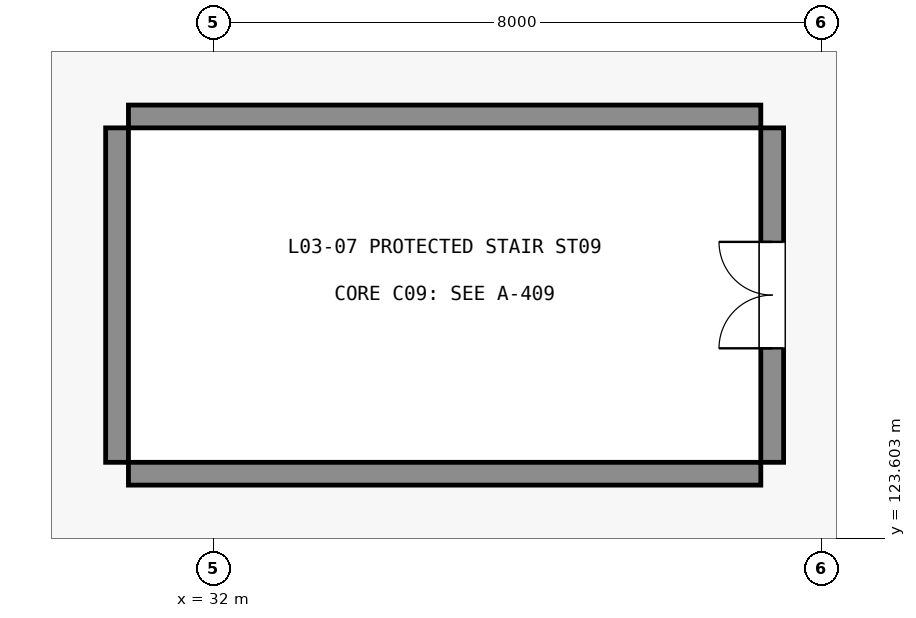
"""IFC4 building model, lengths in metres.
Left out: names, types, materials, properties, quantities, classifications, styles, units other than length and angle.
Written with IfcOpenShell. Run it as: python <this file> out.ifc"""

import sys

from ifc_helpers import new_model, si_unit, direction, frame, frame_2d, origin, place, context, subcontext, project, spatial, rectangle, extrude, element, fill, save


model = new_model("IFC4")
c1 = context("Model", 3, precision=1e-05, world=origin(), true_north=direction((0.0, 1.0)))
c2 = subcontext(c1, "Body", "Model", "MODEL_VIEW")
j1 = project(units=[si_unit("LENGTHUNIT", "METRE"), si_unit("PLANEANGLEUNIT", "RADIAN")], contexts=[c1])
p1 = place(None, origin())
s1 = spatial("IfcSite", under=j1, at=p1, CompositionType="ELEMENT")
p2 = place(p1, origin())
s2 = spatial("IfcBuilding", under=s1, at=p2, CompositionType="ELEMENT")
p3 = place(p2, frame((0.0, 0.0, 16.2)))
s3 = spatial("IfcBuildingStorey", under=s2, at=p3, CompositionType="ELEMENT", Elevation=16.2)
for number, where, z_axis, x_axis in (
    (1, (30.88, 124.45, 0.0), (0.0, 0.0, 1.0), (1.0, 0.0, 0.0)),
    (2, (30.88, 129.15, 0.0), (0.0, 0.0, 1.0), (1.0, 0.0, 0.0)),
):
    element("IfcWall", number, at=place(p3, frame(where, z_axis=z_axis, x_axis=x_axis)), inside=s3, PredefinedType="SHEAR", context=c2, shape_type="SweptSolid", body=[
        extrude(rectangle(XDim=8.32, YDim=0.3, at=frame_2d((4.16, 0.0))), origin(), (0.0, 0.0, 1.0), 4.46),
    ])
p4 = place(p3, frame((30.73, 124.6, 0.0), z_axis=(0.0, 0.0, 1.0), x_axis=(0.0, 1.0, 0.0)))
e3 = element("IfcWall", 3, at=p4, inside=s3, PredefinedType="SHEAR", context=c2, shape_type="SweptSolid", body=[
    extrude(rectangle(XDim=4.4, YDim=0.3, at=frame_2d((2.2, 0.0))), origin(), (0.0, 0.0, 1.0), 4.46),
])
p5 = place(p3, frame((39.35, 124.6, 0.0), z_axis=(0.0, 0.0, 1.0), x_axis=(0.0, 1.0, 0.0)))
e4 = element("IfcWall", 4, at=p5, inside=s3, PredefinedType="SHEAR", context=c2, shape_type="SweptSolid", body=[
    extrude(rectangle(XDim=4.4, YDim=0.3, at=frame_2d((2.2, 0.0))), origin(), (0.0, 0.0, 1.0), 4.46),
])
p6 = place(p5, frame((1.5, 0.0, 0.0)))
e5 = element("IfcOpeningElement", 5, at=p6, cuts=e4, PredefinedType="OPENING", context=c2, shape_type="SweptSolid", body=[
    extrude(rectangle(XDim=1.4, YDim=2.2, at=frame_2d((0.7, 1.1))), frame((0.0, 0.16, 0.0), z_axis=(0.0, -1.0, 0.0), x_axis=(1.0, 0.0, 0.0)), (0.0, 0.0, 1.0), 0.32),
])
p7 = place(p6, origin())
e6 = element("IfcDoor", 6, at=p7, inside=s3, OperationType="DOUBLE_DOOR_SINGLE_SWING", PredefinedType="DOOR", context=c2, shape_type="SweptSolid", body=[
    extrude(rectangle(XDim=1.4, YDim=2.2, at=frame_2d((0.7, 1.1))), frame((0.0, 0.025, 0.0), z_axis=(0.0, -1.0, 0.0), x_axis=(1.0, 0.0, 0.0)), (0.0, 0.0, 1.0), 0.05),
])
fill(e5, e6)
save(model, sys.argv[1])
